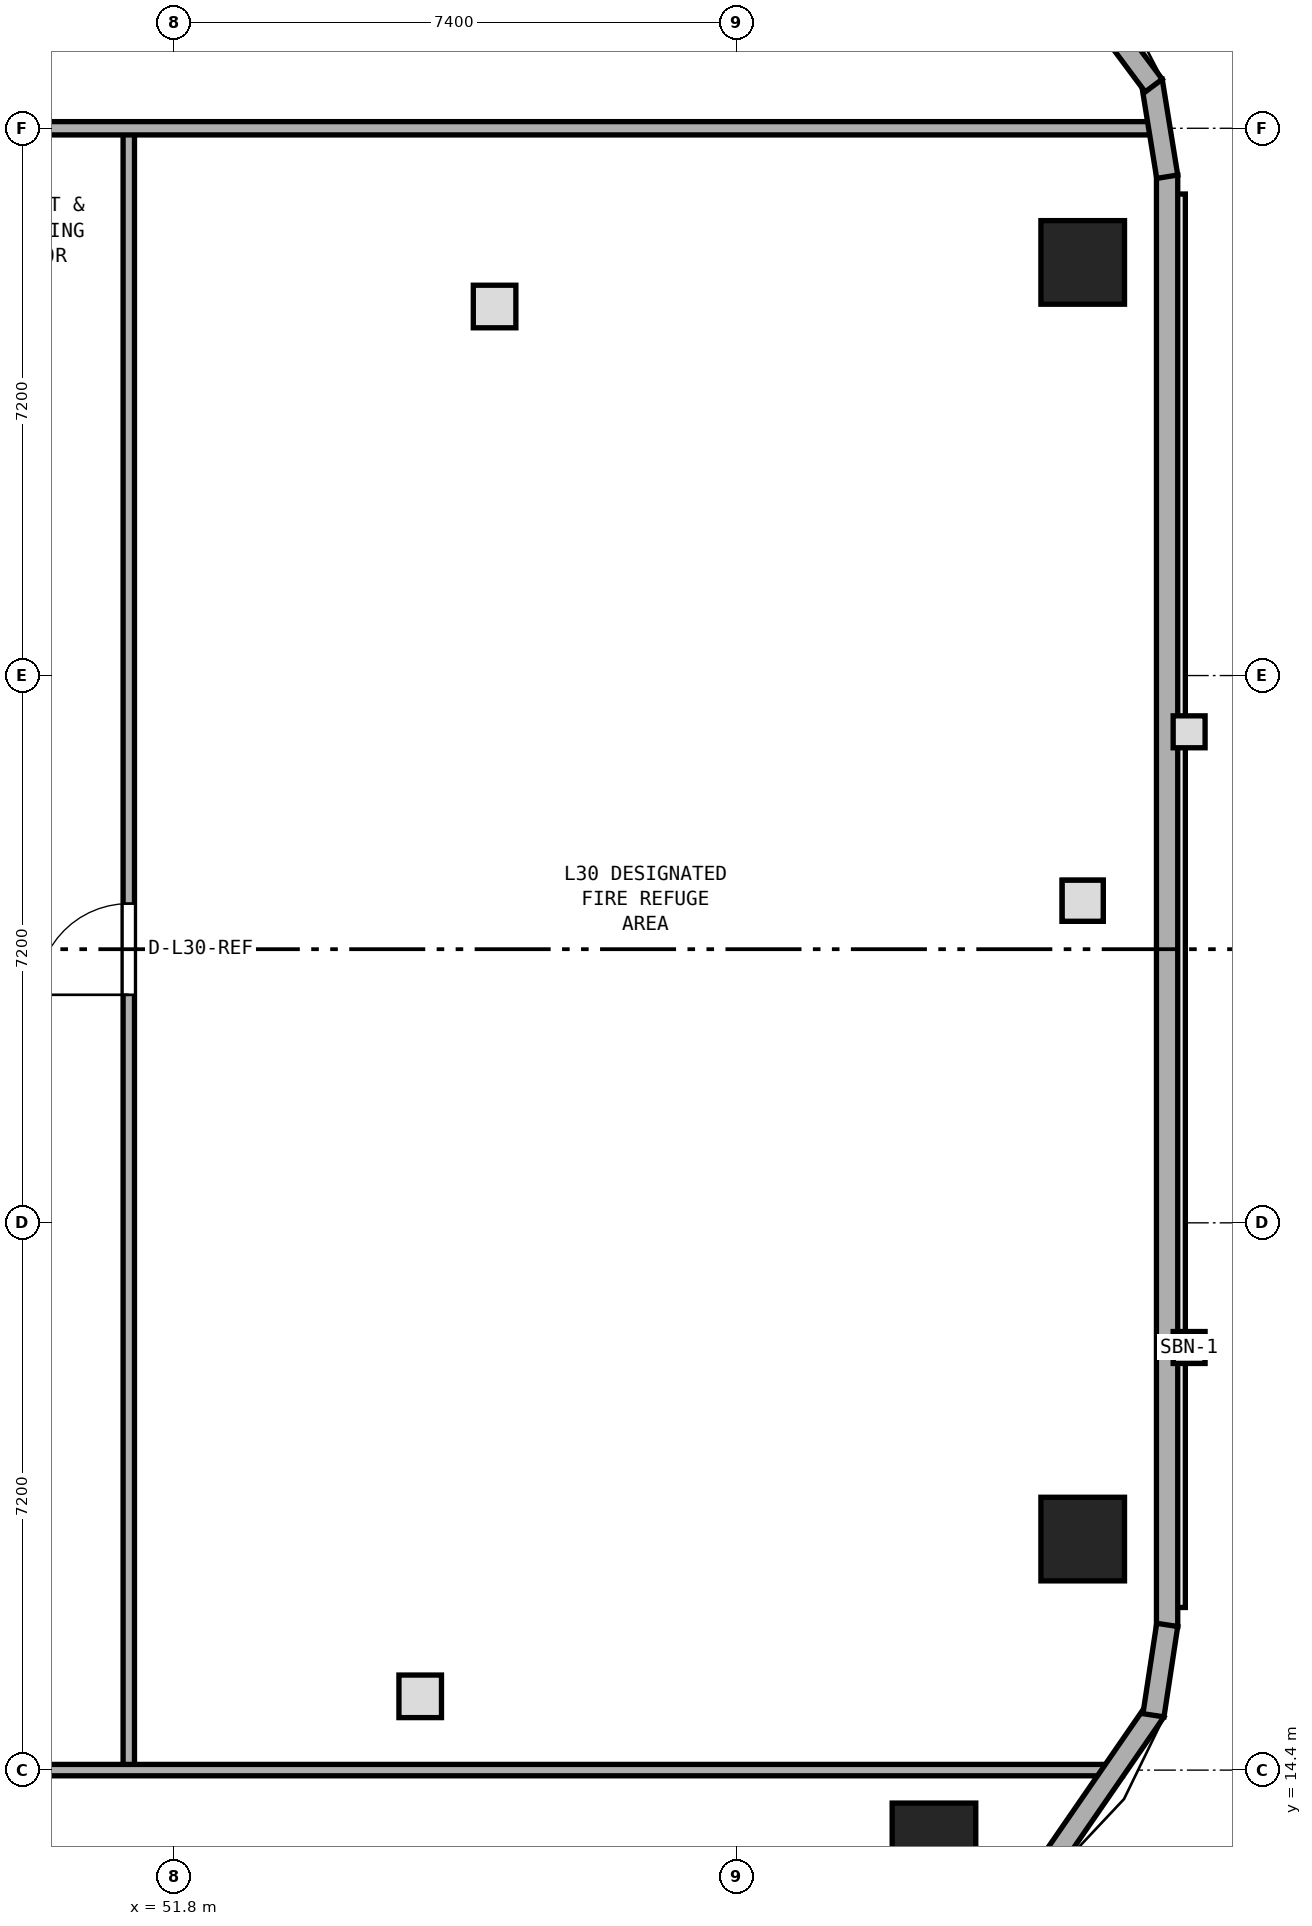
"""IFC4 building model, lengths in metres.
Left out: names, types, materials, properties, quantities, classifications, styles, units other than length and angle.
Written with IfcOpenShell. Run it as: python <this file> out.ifc"""

import sys

from ifc_helpers import new_model, si_unit, direction, frame, frame_2d, origin, origin_2d, place, context, subcontext, project, spatial, rectangle, extrude, element, fill, save


model = new_model("IFC4")
c1 = context("Model", 3, precision=1e-05, world=origin(), true_north=direction((0.0, 1.0)))
c2 = subcontext(c1, "Body", "Model", "MODEL_VIEW")
j1 = project(units=[si_unit("LENGTHUNIT", "METRE"), si_unit("PLANEANGLEUNIT", "RADIAN")], contexts=[c1])
p1 = place(None, origin())
s1 = spatial("IfcSite", under=j1, at=p1, CompositionType="ELEMENT")
p2 = place(p1, origin())
s2 = spatial("IfcBuilding", under=s1, at=p2, CompositionType="ELEMENT")
p3 = place(p2, frame((0.0, 0.0, 120.0)))
s3 = spatial("IfcBuildingStorey", under=s2, at=p3, CompositionType="ELEMENT", Elevation=120.0)
for number, where, z_axis, x_axis in (
    (1, (61.793, 13.416, 0.0), (0.0, 0.0, 1.0), (1.0, 0.0, 0.0)),
    (2, (63.75, 17.44, 0.0), (0.0, 0.0, 1.0), (1.0, 0.0, 0.0)),
    (3, (63.75, 34.235, 0.0), (0.0, 0.0, 1.0), (1.0, 0.0, 0.0)),
):
    element("IfcColumn", number, at=place(p3, frame(where, z_axis=z_axis, x_axis=x_axis)), inside=s3, PredefinedType="COLUMN", context=c2, shape_type="SweptSolid", body=[
        extrude(rectangle(XDim=1.1, YDim=1.1, at=origin_2d()), origin(), (0.0, 0.0, 1.0), 5.0),
    ])
p4 = place(p3, frame((51.2, 14.4, 0.0), z_axis=(0.0, 0.0, 1.0), x_axis=(0.0, 1.0, 0.0)))
e4 = element("IfcWall", 4, at=p4, inside=s3, PredefinedType="PARTITIONING", context=c2, shape_type="SweptSolid", body=[
    extrude(rectangle(XDim=21.6, YDim=0.15, at=frame_2d((10.8, 0.0))), origin(), (0.0, 0.0, 1.0), 4.6),
])
p5 = place(p4, frame((10.2, 0.0, 0.0)))
e5 = element("IfcOpeningElement", 5, at=p5, cuts=e4, PredefinedType="OPENING", context=c2, shape_type="SweptSolid", body=[
    extrude(rectangle(XDim=1.2, YDim=2.15, at=frame_2d((0.6, 1.075))), frame((0.0, 0.085, 0.0), z_axis=(0.0, -1.0, 0.0), x_axis=(1.0, 0.0, 0.0)), (0.0, 0.0, 1.0), 0.17),
])
p6 = place(p3, frame((11.264, 14.4, 0.0), z_axis=(0.0, 0.0, 1.0), x_axis=(1.0, 0.0, 0.0)))
e6 = element("IfcWall", 6, at=p6, inside=s3, PredefinedType="PARTITIONING", context=c2, shape_type="SweptSolid", body=[
    extrude(rectangle(XDim=53.009, YDim=0.15, at=frame_2d((26.504, 0.0))), origin(), (0.0, 0.0, 1.0), 2.2),
])
p7 = place(p6, frame((25.236, 0.0, 0.0)))
e7 = element("IfcOpeningElement", 7, at=p7, cuts=e6, PredefinedType="OPENING", context=c2, shape_type="SweptSolid", body=[
    extrude(rectangle(XDim=1.0, YDim=2.04, at=frame_2d((0.5, 1.02))), frame((0.0, 0.085, 0.0), z_axis=(0.0, -1.0, 0.0), x_axis=(1.0, 0.0, 0.0)), (0.0, 0.0, 1.0), 0.17),
])
p8 = place(p3, frame((11.703, 36.0, 0.0), z_axis=(0.0, 0.0, 1.0), x_axis=(1.0, 0.0, 0.0)))
e8 = element("IfcWall", 8, at=p8, inside=s3, PredefinedType="PARTITIONING", context=c2, shape_type="SweptSolid", body=[
    extrude(rectangle(XDim=52.993, YDim=0.175, at=frame_2d((26.497, 0.0))), origin(), (0.0, 0.0, 1.0), 2.2),
])
p9 = place(p8, frame((24.797, 0.0, 0.0)))
e9 = element("IfcOpeningElement", 9, at=p9, cuts=e8, PredefinedType="OPENING", context=c2, shape_type="SweptSolid", body=[
    extrude(rectangle(XDim=1.0, YDim=2.04, at=frame_2d((0.5, 1.02))), frame((0.0, 0.097, 0.0), z_axis=(0.0, -1.0, 0.0), x_axis=(1.0, 0.0, 0.0)), (0.0, 0.0, 1.0), 0.195),
])
p10 = place(p3, frame((64.86, 16.29, 0.0), z_axis=(0.0, 0.0, 1.0), x_axis=(0.0, 1.0, 0.0)))
e10 = element("IfcWall", 10, at=p10, inside=s3, PredefinedType="STANDARD", context=c2, shape_type="SweptSolid", body=[
    extrude(rectangle(XDim=19.096, YDim=0.28, at=frame_2d((9.548, 0.0))), origin(), (0.0, 0.0, 1.0), 3.907),
])
p11 = place(p3, frame((63.354, 13.222, 0.0), z_axis=(0.0, 0.0, 1.0), x_axis=(0.567639386418, 0.82327730868, 0.0)))
e11 = element("IfcWall", 11, at=p11, inside=s3, PredefinedType="STANDARD", context=c2, shape_type="SweptSolid", body=[
    extrude(rectangle(XDim=2.378, YDim=0.28, at=frame_2d((1.189, 0.0))), origin(), (0.0, 0.0, 1.0), 4.6),
])
p12 = place(p3, frame((64.681, 15.122, 0.0), z_axis=(0.0, 0.0, 1.0), x_axis=(0.150226326126, 0.98865163275, 0.0)))
e12 = element("IfcWall", 12, at=p12, inside=s3, PredefinedType="STANDARD", context=c2, shape_type="SweptSolid", body=[
    extrude(rectangle(XDim=1.203, YDim=0.28, at=frame_2d((0.601, 0.0))), origin(), (0.0, 0.0, 1.0), 4.6),
])
p13 = place(p3, frame((64.862, 35.363, 0.0), z_axis=(0.0, 0.0, 1.0), x_axis=(-0.159653222715, 0.98717316033, 0.0)))
e13 = element("IfcWall", 13, at=p13, inside=s3, PredefinedType="STANDARD", context=c2, shape_type="SweptSolid", body=[
    extrude(rectangle(XDim=1.277, YDim=0.28, at=frame_2d((0.638, 0.0))), origin(), (0.0, 0.0, 1.0), 4.6),
])
p14 = place(p3, frame((64.684, 36.562, 0.0), z_axis=(0.0, 0.0, 1.0), x_axis=(-0.598123405715, 0.801404012677, 0.0)))
e14 = element("IfcWall", 14, at=p14, inside=s3, PredefinedType="STANDARD", context=c2, shape_type="SweptSolid", body=[
    extrude(rectangle(XDim=2.521, YDim=0.28, at=frame_2d((1.26, 0.0))), origin(), (0.0, 0.0, 1.0), 4.6),
])
p15 = place(p5, origin())
e15 = element("IfcDoor", 15, at=p15, inside=s3, OperationType="SINGLE_SWING_LEFT", PredefinedType="DOOR", context=c2, shape_type="SweptSolid", body=[
    extrude(rectangle(XDim=1.2, YDim=2.15, at=frame_2d((0.6, 1.075))), frame((0.0, 0.025, 0.0), z_axis=(0.0, -1.0, 0.0), x_axis=(1.0, 0.0, 0.0)), (0.0, 0.0, 1.0), 0.05),
])
fill(e5, e15)
save(model, sys.argv[1])
